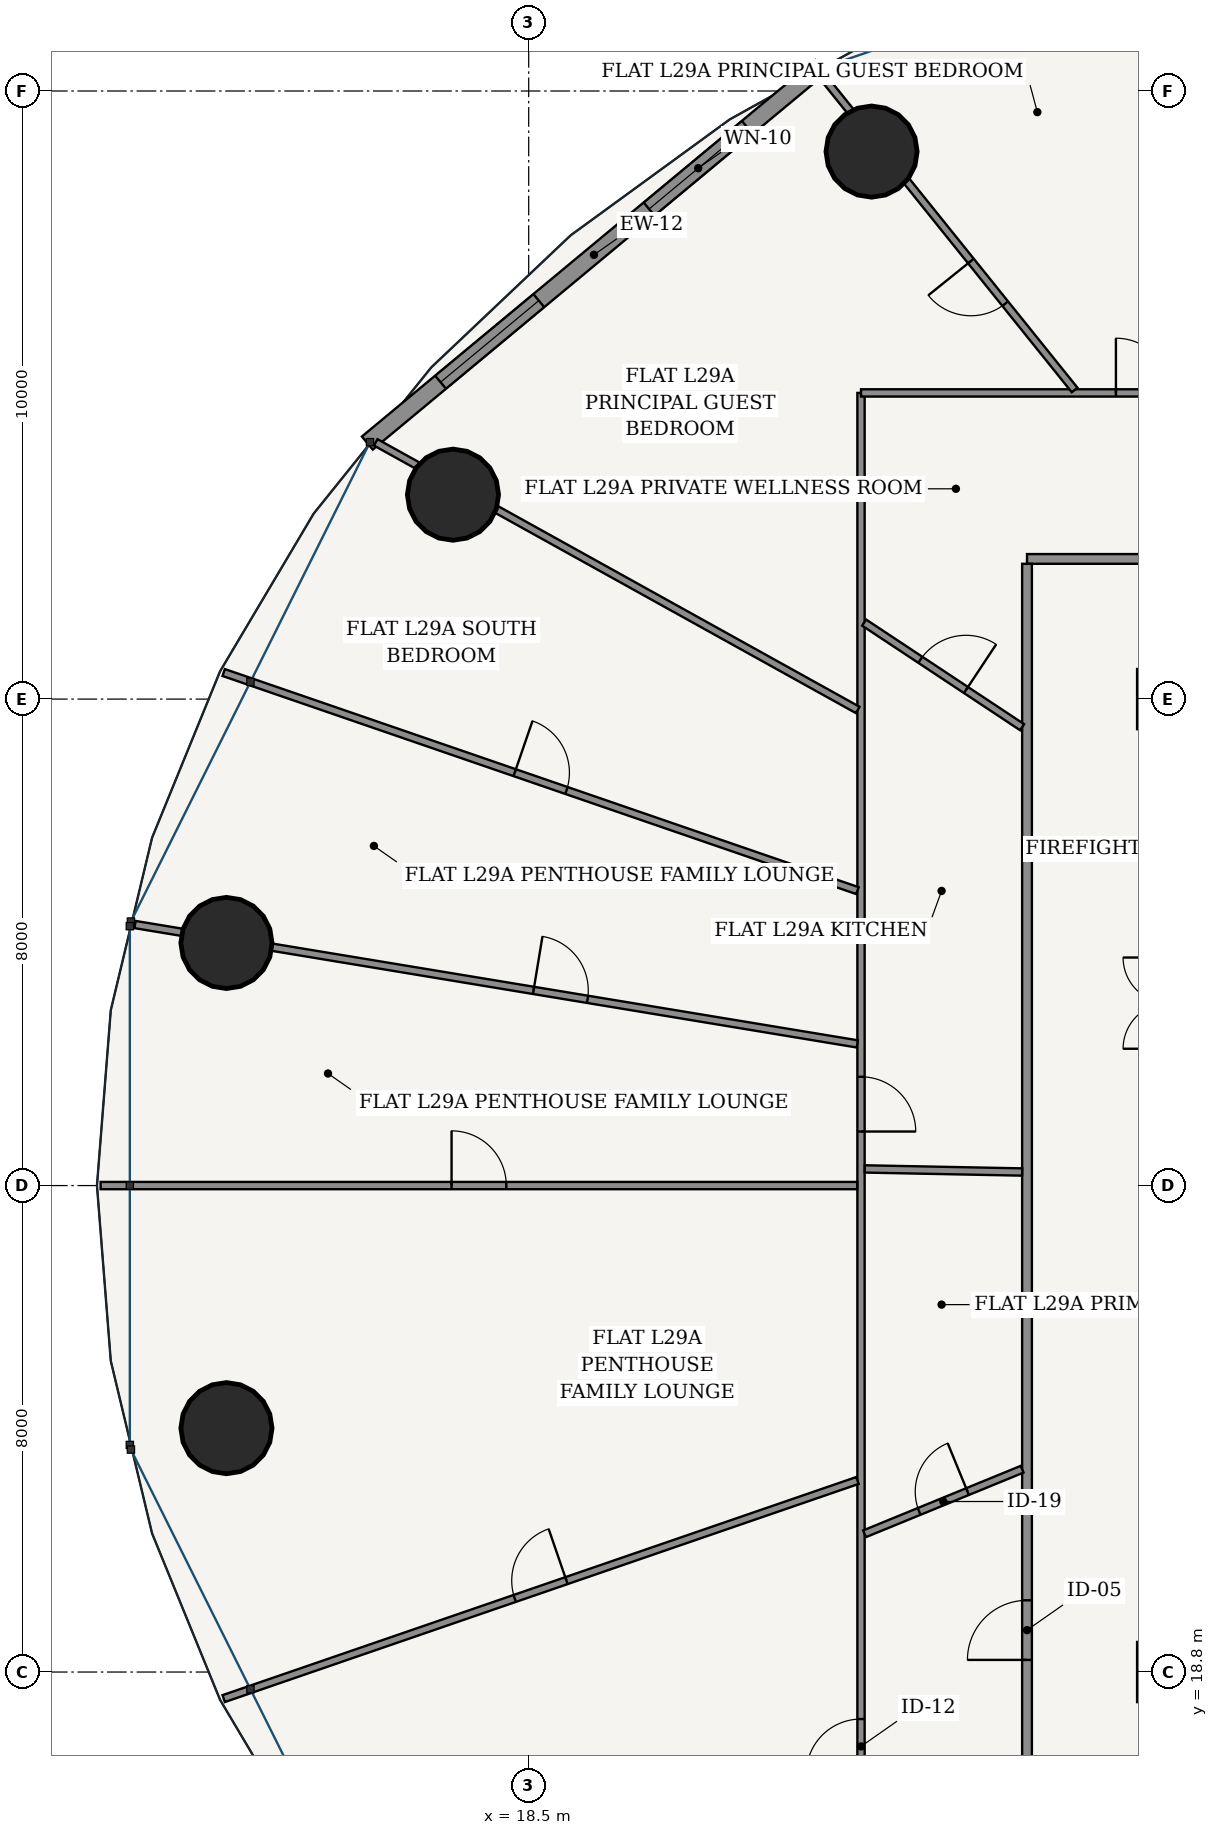
"""IFC4 building model, lengths in metres.
Left out: names, types, materials, properties, quantities, classifications, styles, units other than length and angle.
Written with IfcOpenShell. Run it as: python <this file> out.ifc"""

import sys

from ifc_helpers import new_model, si_unit, direction, frame, frame_2d, origin, origin_2d, place, context, subcontext, project, spatial, rectangle, hollow_circle, extrude, source, transform, mapped, element, fill, save


model = new_model("IFC4")
c1 = context("Model", 3, precision=1e-05, world=origin(), true_north=direction((-0.2419218956, 0.970295726276)))
c2 = subcontext(c1, "Body", "Model", "MODEL_VIEW")
j1 = project(units=[si_unit("LENGTHUNIT", "METRE"), si_unit("PLANEANGLEUNIT", "RADIAN")], contexts=[c1])
p1 = place(None, origin())
s1 = spatial("IfcSite", under=j1, at=p1, CompositionType="ELEMENT")
p2 = place(p1, origin())
s2 = spatial("IfcBuilding", under=s1, at=p2, CompositionType="ELEMENT")
p3 = place(p2, frame((0.0, 0.0, 112.2)))
s3 = spatial("IfcBuildingStorey", under=s2, at=p3, CompositionType="ELEMENT", Elevation=112.2)
for number, where, z_axis, x_axis in (
    (1, (24.138, 43.803, 0.0), (0.0, 0.0, 1.0), (1.0, 0.0, 0.0)),
    (2, (17.255, 38.161, 0.0), (0.0, 0.0, 1.0), (1.0, 0.0, 0.0)),
    (3, (13.529, 30.79, 0.0), (0.0, 0.0, 1.0), (1.0, 0.0, 0.0)),
    (4, (13.529, 22.81, 0.0), (0.0, 0.0, 1.0), (1.0, 0.0, 0.0)),
):
    element("IfcColumn", number, at=place(p3, frame(where, z_axis=z_axis, x_axis=x_axis)), inside=s3, PredefinedType="COLUMN", context=c2, shape_type="SweptSolid", body=[
        extrude(hollow_circle(Radius=0.75, WallThickness=0.045, at=origin_2d()), origin(), (0.0, 0.0, 1.0), 3.6),
    ])
p4 = place(p3, frame((23.3, 45.202, 0.0), z_axis=(0.0, 0.0, 1.0), x_axis=(-0.769242574941, -0.638956853706, 0.0)))
e5 = element("IfcWall", 5, at=p4, inside=s3, PredefinedType="SOLIDWALL", context=c2, shape_type="SweptSolid", body=[
    extrude(rectangle(XDim=9.69, YDim=0.28, at=frame_2d((4.845, 0.0))), origin(), (0.0, 0.0, 1.0), 3.325),
])
p5 = place(p4, frame((1.566, 0.0, 0.85)))
e6 = element("IfcOpeningElement", 6, at=p5, cuts=e5, PredefinedType="OPENING", context=c2, shape_type="SweptSolid", body=[
    extrude(rectangle(XDim=2.1, YDim=1.95, at=frame_2d((1.05, 0.975))), frame((0.0, 0.15, 0.0), z_axis=(0.0, -1.0, 0.0), x_axis=(1.0, 0.0, 0.0)), (0.0, 0.0, 1.0), 0.3),
])
p6 = place(p4, frame((6.023, 0.0, 0.85)))
e7 = element("IfcOpeningElement", 7, at=p6, cuts=e5, PredefinedType="OPENING", context=c2, shape_type="SweptSolid", body=[
    extrude(rectangle(XDim=2.1, YDim=1.95, at=frame_2d((1.05, 0.975))), frame((0.0, 0.15, 0.0), z_axis=(0.0, -1.0, 0.0), x_axis=(1.0, 0.0, 0.0)), (0.0, 0.0, 1.0), 0.3),
])
p7 = place(p3, frame((26.695, 37.105, 0.0), z_axis=(0.0, 0.0, 1.0), x_axis=(1.0, 0.0, 0.0)))
e8 = element("IfcWall", 8, at=p7, inside=s3, PredefinedType="PARTITIONING", context=c2, shape_type="SweptSolid", body=[
    extrude(rectangle(XDim=22.61, YDim=0.16, at=frame_2d((11.305, 0.0))), origin(), (0.0, 0.0, 1.0), 2.767),
])
p8 = place(p3, frame((26.695, 16.575, 0.0), z_axis=(0.0, 0.0, 1.0), x_axis=(0.0, 1.0, 0.0)))
e9 = element("IfcWall", 9, at=p8, inside=s3, PredefinedType="PARTITIONING", context=c2, shape_type="SweptSolid", body=[
    extrude(rectangle(XDim=20.45, YDim=0.16, at=frame_2d((10.225, 0.0))), origin(), (0.0, 0.0, 1.0), 2.767),
])
p9 = place(p8, frame((2.424, 0.0, 0.0)))
e10 = element("IfcOpeningElement", 10, at=p9, cuts=e9, PredefinedType="OPENING", context=c2, shape_type="SweptSolid", body=[
    extrude(rectangle(XDim=0.98, YDim=2.2, at=frame_2d((0.49, 1.1))), frame((0.0, 0.09, 0.0), z_axis=(0.0, -1.0, 0.0), x_axis=(1.0, 0.0, 0.0)), (0.0, 0.0, 1.0), 0.18),
])
p10 = place(p3, frame((23.965, 13.765, 0.0), z_axis=(0.0, 0.0, 1.0), x_axis=(0.0, 1.0, 0.0)))
e11 = element("IfcWall", 11, at=p10, inside=s3, PredefinedType="PARTITIONING", context=c2, shape_type="SweptSolid", body=[
    extrude(rectangle(XDim=26.07, YDim=0.12, at=frame_2d((13.035, 0.0))), origin(), (0.0, 0.0, 1.0), 2.767),
])
p11 = place(p10, frame((3.362, 0.0, 0.0)))
e12 = element("IfcOpeningElement", 12, at=p11, cuts=e11, PredefinedType="OPENING", context=c2, shape_type="SweptSolid", body=[
    extrude(rectangle(XDim=0.9, YDim=2.15, at=frame_2d((0.45, 1.075))), frame((0.0, 0.07, 0.0), z_axis=(0.0, -1.0, 0.0), x_axis=(1.0, 0.0, 0.0)), (0.0, 0.0, 1.0), 0.14),
])
p12 = place(p10, frame((13.924, 0.0, 0.0)))
e13 = element("IfcOpeningElement", 13, at=p12, cuts=e11, PredefinedType="OPENING", context=c2, shape_type="SweptSolid", body=[
    extrude(rectangle(XDim=0.9, YDim=2.15, at=frame_2d((0.45, 1.075))), frame((0.0, 0.07, 0.0), z_axis=(0.0, -1.0, 0.0), x_axis=(1.0, 0.0, 0.0)), (0.0, 0.0, 1.0), 0.14),
])
p13 = place(p3, frame((23.965, 39.835, 0.0), z_axis=(0.0, 0.0, 1.0), x_axis=(1.0, 0.0, 0.0)))
e14 = element("IfcWall", 14, at=p13, inside=s3, PredefinedType="PARTITIONING", context=c2, shape_type="SweptSolid", body=[
    extrude(rectangle(XDim=24.416, YDim=0.12, at=frame_2d((12.208, 0.0))), origin(), (0.0, 0.0, 1.0), 2.767),
])
p14 = place(p13, frame((4.192, 0.0, 0.0)))
e15 = element("IfcOpeningElement", 15, at=p14, cuts=e14, PredefinedType="OPENING", context=c2, shape_type="SweptSolid", body=[
    extrude(rectangle(XDim=0.9, YDim=2.15, at=frame_2d((0.45, 1.075))), frame((0.0, 0.07, 0.0), z_axis=(0.0, -1.0, 0.0), x_axis=(1.0, 0.0, 0.0)), (0.0, 0.0, 1.0), 0.14),
])
p15 = place(p13, frame((19.728, 0.0, 0.0)))
e16 = element("IfcOpeningElement", 16, at=p15, cuts=e14, PredefinedType="OPENING", context=c2, shape_type="SweptSolid", body=[
    extrude(rectangle(XDim=0.86, YDim=2.15, at=frame_2d((0.43, 1.075))), frame((0.0, 0.07, 0.0), z_axis=(0.0, -1.0, 0.0), x_axis=(1.0, 0.0, 0.0)), (0.0, 0.0, 1.0), 0.14),
])
p16 = place(p3, frame((31.474, 39.89, 0.0), z_axis=(0.0, 0.0, 1.0), x_axis=(-0.446167584581, 0.894949432353, 0.0)))
e17 = element("IfcWall", 17, at=p16, inside=s3, PredefinedType="PARTITIONING", context=c2, shape_type="SweptSolid", body=[
    extrude(rectangle(XDim=8.125, YDim=0.12, at=frame_2d((4.062, 0.0))), origin(), (0.0, 0.0, 1.0), 2.767),
])
p17 = place(p16, frame((3.612, 0.0, 0.0)))
e18 = element("IfcOpeningElement", 18, at=p17, cuts=e17, PredefinedType="OPENING", context=c2, shape_type="SweptSolid", body=[
    extrude(rectangle(XDim=0.9, YDim=2.15, at=frame_2d((0.45, 1.075))), frame((0.0, 0.07, 0.0), z_axis=(0.0, -1.0, 0.0), x_axis=(1.0, 0.0, 0.0)), (0.0, 0.0, 1.0), 0.14),
])
p18 = place(p3, frame((27.478, 39.883, 0.0), z_axis=(0.0, 0.0, 1.0), x_axis=(-0.62672583251, 0.779239841682, 0.0)))
e19 = element("IfcWall", 19, at=p18, inside=s3, PredefinedType="PARTITIONING", context=c2, shape_type="SweptSolid", body=[
    extrude(rectangle(XDim=6.678, YDim=0.12, at=frame_2d((3.339, 0.0))), origin(), (0.0, 0.0, 1.0), 2.767),
])
p19 = place(p18, frame((1.821, 0.0, 0.0)))
e20 = element("IfcOpeningElement", 20, at=p19, cuts=e19, PredefinedType="OPENING", context=c2, shape_type="SweptSolid", body=[
    extrude(rectangle(XDim=0.9, YDim=2.15, at=frame_2d((0.45, 1.075))), frame((0.0, 0.07, 0.0), z_axis=(0.0, -1.0, 0.0), x_axis=(1.0, 0.0, 0.0)), (0.0, 0.0, 1.0), 0.14),
])
p20 = place(p3, frame((23.911, 34.622, 0.0), z_axis=(0.0, 0.0, 1.0), x_axis=(-0.874324904351, 0.485341077626, 0.0)))
e21 = element("IfcWall", 21, at=p20, inside=s3, PredefinedType="PARTITIONING", context=c2, shape_type="SweptSolid", body=[
    extrude(rectangle(XDim=9.066, YDim=0.12, at=frame_2d((4.533, 0.0))), origin(), (0.0, 0.0, 1.0), 2.767),
])
p21 = place(p3, frame((23.906, 31.65, 0.0), z_axis=(0.0, 0.0, 1.0), x_axis=(-0.945573120726, 0.32540970078, 0.0)))
e22 = element("IfcWall", 22, at=p21, inside=s3, PredefinedType="PARTITIONING", context=c2, shape_type="SweptSolid", body=[
    extrude(rectangle(XDim=11.022, YDim=0.12, at=frame_2d((5.511, 0.0))), origin(), (0.0, 0.0, 1.0), 2.767),
])
p22 = place(p21, frame((5.061, 0.0, 0.0)))
e23 = element("IfcOpeningElement", 23, at=p22, cuts=e22, PredefinedType="OPENING", context=c2, shape_type="SweptSolid", body=[
    extrude(rectangle(XDim=0.9, YDim=2.15, at=frame_2d((0.45, 1.075))), frame((0.0, 0.07, 0.0), z_axis=(0.0, -1.0, 0.0), x_axis=(1.0, 0.0, 0.0)), (0.0, 0.0, 1.0), 0.14),
])
p23 = place(p3, frame((23.904, 29.13, 0.0), z_axis=(0.0, 0.0, 1.0), x_axis=(-0.986618264768, 0.163047231274, 0.0)))
e24 = element("IfcWall", 24, at=p23, inside=s3, PredefinedType="PARTITIONING", context=c2, shape_type="SweptSolid", body=[
    extrude(rectangle(XDim=12.039, YDim=0.12, at=frame_2d((6.02, 0.0))), origin(), (0.0, 0.0, 1.0), 2.767),
])
p24 = place(p23, frame((4.496, 0.0, 0.0)))
e25 = element("IfcOpeningElement", 25, at=p24, cuts=e24, PredefinedType="OPENING", context=c2, shape_type="SweptSolid", body=[
    extrude(rectangle(XDim=0.9, YDim=2.15, at=frame_2d((0.45, 1.075))), frame((0.0, 0.07, 0.0), z_axis=(0.0, -1.0, 0.0), x_axis=(1.0, 0.0, 0.0)), (0.0, 0.0, 1.0), 0.14),
])
p25 = place(p3, frame((23.903, 26.8, 0.0), z_axis=(0.0, 0.0, 1.0), x_axis=(-1.0, 0.0, 0.0)))
e26 = element("IfcWall", 26, at=p25, inside=s3, PredefinedType="PARTITIONING", context=c2, shape_type="SweptSolid", body=[
    extrude(rectangle(XDim=12.443, YDim=0.12, at=frame_2d((6.222, 0.0))), origin(), (0.0, 0.0, 1.0), 2.767),
])
p26 = place(p25, frame((5.771, 0.0, 0.0)))
e27 = element("IfcOpeningElement", 27, at=p26, cuts=e26, PredefinedType="OPENING", context=c2, shape_type="SweptSolid", body=[
    extrude(rectangle(XDim=0.9, YDim=2.15, at=frame_2d((0.45, 1.075))), frame((0.0, 0.07, 0.0), z_axis=(0.0, -1.0, 0.0), x_axis=(1.0, 0.0, 0.0)), (0.0, 0.0, 1.0), 0.14),
])
p27 = place(p3, frame((23.906, 21.95, 0.0), z_axis=(0.0, 0.0, 1.0), x_axis=(-0.945573120726, -0.32540970078, 0.0)))
e28 = element("IfcWall", 28, at=p27, inside=s3, PredefinedType="PARTITIONING", context=c2, shape_type="SweptSolid", body=[
    extrude(rectangle(XDim=11.022, YDim=0.12, at=frame_2d((5.511, 0.0))), origin(), (0.0, 0.0, 1.0), 2.767),
])
p28 = place(p27, frame((5.061, 0.0, 0.0)))
e29 = element("IfcOpeningElement", 29, at=p28, cuts=e28, PredefinedType="OPENING", context=c2, shape_type="SweptSolid", body=[
    extrude(rectangle(XDim=0.9, YDim=2.15, at=frame_2d((0.45, 1.075))), frame((0.0, 0.07, 0.0), z_axis=(0.0, -1.0, 0.0), x_axis=(1.0, 0.0, 0.0)), (0.0, 0.0, 1.0), 0.14),
])
p29 = place(p3, frame((26.615, 34.337, 0.0), z_axis=(0.0, 0.0, 1.0), x_axis=(-0.833829855758, 0.552021531868, 0.0)))
e30 = element("IfcWall", 30, at=p29, inside=s3, PredefinedType="PARTITIONING", context=c2, shape_type="SweptSolid", body=[
    extrude(rectangle(XDim=3.116, YDim=0.12, at=frame_2d((1.558, 0.0))), origin(), (0.0, 0.0, 1.0), 3.325),
])
p30 = place(p29, frame((1.108, 0.0, 0.0)))
e31 = element("IfcOpeningElement", 31, at=p30, cuts=e30, PredefinedType="OPENING", context=c2, shape_type="SweptSolid", body=[
    extrude(rectangle(XDim=0.9, YDim=2.15, at=frame_2d((0.45, 1.075))), frame((0.0, 0.07, 0.0), z_axis=(0.0, -1.0, 0.0), x_axis=(1.0, 0.0, 0.0)), (0.0, 0.0, 1.0), 0.14),
])
p31 = place(p3, frame((26.615, 27.023, 0.0), z_axis=(0.0, 0.0, 1.0), x_axis=(-0.999809377232, 0.019524579348, 0.0)))
e32 = element("IfcWall", 32, at=p31, inside=s3, PredefinedType="PARTITIONING", context=c2, shape_type="SweptSolid", body=[
    extrude(rectangle(XDim=2.588, YDim=0.12, at=frame_2d((1.294, 0.0))), origin(), (0.0, 0.0, 1.0), 3.325),
])
p32 = place(p3, frame((26.615, 22.135, 0.0), z_axis=(0.0, 0.0, 1.0), x_axis=(-0.925337216259, -0.379145138708, 0.0)))
e33 = element("IfcWall", 33, at=p32, inside=s3, PredefinedType="PARTITIONING", context=c2, shape_type="SweptSolid", body=[
    extrude(rectangle(XDim=2.802, YDim=0.12, at=frame_2d((1.401, 0.0))), origin(), (0.0, 0.0, 1.0), 3.325),
])
p33 = place(p32, frame((0.971, 0.0, 0.0)))
e34 = element("IfcOpeningElement", 34, at=p33, cuts=e33, PredefinedType="OPENING", context=c2, shape_type="SweptSolid", body=[
    extrude(rectangle(XDim=0.86, YDim=2.15, at=frame_2d((0.43, 1.075))), frame((0.0, 0.07, 0.0), z_axis=(0.0, -1.0, 0.0), x_axis=(1.0, 0.0, 0.0)), (0.0, 0.0, 1.0), 0.14),
])
m1 = source(origin(), c2, "Body", "SweptSolid", [
    extrude(rectangle(XDim=2.1, YDim=1.95, at=frame_2d((1.05, 0.975))), frame((0.0, 0.03, 0.0), z_axis=(0.0, -1.0, 0.0), x_axis=(1.0, 0.0, 0.0)), (0.0, 0.0, 1.0), 0.06),
])
p34 = place(p5, origin())
e35 = element("IfcWindow", 35, at=p34, inside=s3, PartitioningType="SINGLE_PANEL", PredefinedType="WINDOW", context=c2, shape_type="MappedRepresentation", body=[
    mapped(m1, transform((0.0, 0.0, 0.0), scale=1.0)),
])
fill(e6, e35)
p35 = place(p6, origin())
e36 = element("IfcWindow", 36, at=p35, inside=s3, PartitioningType="SINGLE_PANEL", PredefinedType="WINDOW", context=c2, shape_type="MappedRepresentation", body=[
    mapped(m1, transform((0.0, 0.0, 0.0), scale=1.0)),
])
fill(e7, e36)
m2 = source(origin(), c2, "Body", "SweptSolid", [
    extrude(rectangle(XDim=0.98, YDim=2.2, at=frame_2d((0.49, 1.1))), frame((0.0, 0.025, 0.0), z_axis=(0.0, -1.0, 0.0), x_axis=(1.0, 0.0, 0.0)), (0.0, 0.0, 1.0), 0.05),
])
p36 = place(p9, origin())
e37 = element("IfcDoor", 37, at=p36, inside=s3, OperationType="SINGLE_SWING_LEFT", PredefinedType="DOOR", context=c2, shape_type="MappedRepresentation", body=[
    mapped(m2, transform((0.0, 0.0, 0.0), scale=1.0)),
])
fill(e10, e37)
m3 = source(origin(), c2, "Body", "SweptSolid", [
    extrude(rectangle(XDim=0.86, YDim=2.15, at=frame_2d((0.43, 1.075))), frame((0.0, 0.025, 0.0), z_axis=(0.0, -1.0, 0.0), x_axis=(1.0, 0.0, 0.0)), (0.0, 0.0, 1.0), 0.05),
])
p37 = place(p33, frame((0.86, 0.0, 0.0), z_axis=(0.0, 0.0, 1.0), x_axis=(-1.0, 0.0, 0.0)))
e38 = element("IfcDoor", 38, at=p37, inside=s3, OperationType="SINGLE_SWING_RIGHT", PredefinedType="DOOR", context=c2, shape_type="MappedRepresentation", body=[
    mapped(m3, transform((0.0, 0.0, 0.0), scale=1.0)),
])
fill(e34, e38)
m4 = source(origin(), c2, "Body", "SweptSolid", [
    extrude(rectangle(XDim=0.9, YDim=2.15, at=frame_2d((0.45, 1.075))), frame((0.0, 0.025, 0.0), z_axis=(0.0, -1.0, 0.0), x_axis=(1.0, 0.0, 0.0)), (0.0, 0.0, 1.0), 0.05),
])
p38 = place(p11, origin())
e39 = element("IfcDoor", 39, at=p38, inside=s3, OperationType="SINGLE_SWING_LEFT", PredefinedType="DOOR", context=c2, shape_type="MappedRepresentation", body=[
    mapped(m4, transform((0.0, 0.0, 0.0), scale=1.0)),
])
fill(e12, e39)
p39 = place(p28, frame((0.9, 0.0, 0.0), z_axis=(0.0, 0.0, 1.0), x_axis=(-1.0, 0.0, 0.0)))
e40 = element("IfcDoor", 40, at=p39, inside=s3, OperationType="SINGLE_SWING_RIGHT", PredefinedType="DOOR", context=c2, shape_type="MappedRepresentation", body=[
    mapped(m4, transform((0.0, 0.0, 0.0), scale=1.0)),
])
fill(e29, e40)
p40 = place(p26, frame((0.9, 0.0, 0.0), z_axis=(0.0, 0.0, 1.0), x_axis=(-1.0, 0.0, 0.0)))
e41 = element("IfcDoor", 41, at=p40, inside=s3, OperationType="SINGLE_SWING_LEFT", PredefinedType="DOOR", context=c2, shape_type="MappedRepresentation", body=[
    mapped(m4, transform((0.0, 0.0, 0.0), scale=1.0)),
])
fill(e27, e41)
p41 = place(p12, frame((0.9, 0.0, 0.0), z_axis=(0.0, 0.0, 1.0), x_axis=(-1.0, 0.0, 0.0)))
e42 = element("IfcDoor", 42, at=p41, inside=s3, OperationType="SINGLE_SWING_RIGHT", PredefinedType="DOOR", context=c2, shape_type="MappedRepresentation", body=[
    mapped(m4, transform((0.0, 0.0, 0.0), scale=1.0)),
])
fill(e13, e42)
p42 = place(p24, frame((0.9, 0.0, 0.0), z_axis=(0.0, 0.0, 1.0), x_axis=(-1.0, 0.0, 0.0)))
e43 = element("IfcDoor", 43, at=p42, inside=s3, OperationType="SINGLE_SWING_LEFT", PredefinedType="DOOR", context=c2, shape_type="MappedRepresentation", body=[
    mapped(m4, transform((0.0, 0.0, 0.0), scale=1.0)),
])
fill(e25, e43)
p43 = place(p30, frame((0.9, 0.0, 0.0), z_axis=(0.0, 0.0, 1.0), x_axis=(-1.0, 0.0, 0.0)))
e44 = element("IfcDoor", 44, at=p43, inside=s3, OperationType="SINGLE_SWING_RIGHT", PredefinedType="DOOR", context=c2, shape_type="MappedRepresentation", body=[
    mapped(m4, transform((0.0, 0.0, 0.0), scale=1.0)),
])
fill(e31, e44)
p44 = place(p14, origin())
e45 = element("IfcDoor", 45, at=p44, inside=s3, OperationType="SINGLE_SWING_LEFT", PredefinedType="DOOR", context=c2, shape_type="MappedRepresentation", body=[
    mapped(m4, transform((0.0, 0.0, 0.0), scale=1.0)),
])
fill(e15, e45)
p45 = place(p19, origin())
e46 = element("IfcDoor", 46, at=p45, inside=s3, OperationType="SINGLE_SWING_RIGHT", PredefinedType="DOOR", context=c2, shape_type="MappedRepresentation", body=[
    mapped(m4, transform((0.0, 0.0, 0.0), scale=1.0)),
])
fill(e20, e46)
p46 = place(p22, frame((0.9, 0.0, 0.0), z_axis=(0.0, 0.0, 1.0), x_axis=(-1.0, 0.0, 0.0)))
e47 = element("IfcDoor", 47, at=p46, inside=s3, OperationType="SINGLE_SWING_LEFT", PredefinedType="DOOR", context=c2, shape_type="MappedRepresentation", body=[
    mapped(m4, transform((0.0, 0.0, 0.0), scale=1.0)),
])
fill(e23, e47)
save(model, sys.argv[1])
